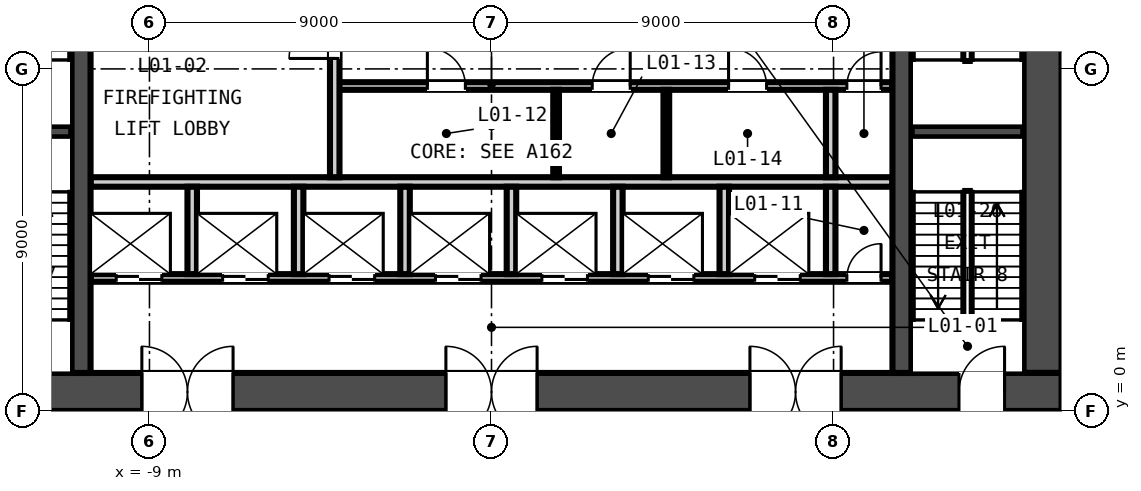
"""IFC4 building model, lengths in metres.
Left out: names, types, materials, properties, quantities, classifications, styles, units other than length and angle.
Written with IfcOpenShell. Run it as: python <this file> out.ifc"""

import sys

from ifc_helpers import new_model, si_unit, direction, frame, frame_2d, origin, place, context, subcontext, project, spatial, rectangle, extrude, element, fill, save


model = new_model("IFC4")
c1 = context("Model", 3, precision=1e-05, world=origin(), true_north=direction((0.0, 1.0)))
c2 = subcontext(c1, "Body", "Model", "MODEL_VIEW")
j1 = project(units=[si_unit("LENGTHUNIT", "METRE"), si_unit("PLANEANGLEUNIT", "RADIAN")], contexts=[c1])
p1 = place(None, origin())
s1 = spatial("IfcSite", under=j1, at=p1, CompositionType="ELEMENT")
p2 = place(p1, origin())
s2 = spatial("IfcBuilding", under=s1, at=p2, CompositionType="ELEMENT")
p3 = place(p2, frame((0.0, 0.0, 9.0)))
s3 = spatial("IfcBuildingStorey", under=s2, at=p3, CompositionType="ELEMENT", Elevation=9.0)
p4 = place(p3, frame((-15.0, 0.5, -0.4), z_axis=(0.0, 0.0, 1.0), x_axis=(1.0, 0.0, 0.0)))
e1 = element("IfcWall", 1, at=p4, inside=s3, PredefinedType="SOLIDWALL", context=c2, shape_type="SweptSolid", body=[
    extrude(rectangle(XDim=30.0, YDim=1.0, at=frame_2d((15.0, 0.0))), origin(), (0.0, 0.0, 1.0), 9.0),
])
p5 = place(p4, frame((5.8, 0.0, 0.4)))
e2 = element("IfcOpeningElement", 2, at=p5, cuts=e1, PredefinedType="OPENING", context=c2, shape_type="SweptSolid", body=[
    extrude(rectangle(XDim=2.4, YDim=2.4, at=frame_2d((1.2, 1.2))), frame((0.0, 0.51, 0.0), z_axis=(0.0, -1.0, 0.0), x_axis=(1.0, 0.0, 0.0)), (0.0, 0.0, 1.0), 1.02),
])
p6 = place(p4, frame((13.8, 0.0, 0.4)))
e3 = element("IfcOpeningElement", 3, at=p6, cuts=e1, PredefinedType="OPENING", context=c2, shape_type="SweptSolid", body=[
    extrude(rectangle(XDim=2.4, YDim=2.4, at=frame_2d((1.2, 1.2))), frame((0.0, 0.51, 0.0), z_axis=(0.0, -1.0, 0.0), x_axis=(1.0, 0.0, 0.0)), (0.0, 0.0, 1.0), 1.02),
])
p7 = place(p4, frame((21.8, 0.0, 0.4)))
e4 = element("IfcOpeningElement", 4, at=p7, cuts=e1, PredefinedType="OPENING", context=c2, shape_type="SweptSolid", body=[
    extrude(rectangle(XDim=2.4, YDim=2.4, at=frame_2d((1.2, 1.2))), frame((0.0, 0.51, 0.0), z_axis=(0.0, -1.0, 0.0), x_axis=(1.0, 0.0, 0.0)), (0.0, 0.0, 1.0), 1.02),
])
p8 = place(p4, frame((1.5, 0.0, 0.4)))
e5 = element("IfcOpeningElement", 5, at=p8, cuts=e1, PredefinedType="OPENING", context=c2, shape_type="SweptSolid", body=[
    extrude(rectangle(XDim=1.2, YDim=2.1, at=frame_2d((0.6, 1.05))), frame((0.0, 0.51, 0.0), z_axis=(0.0, -1.0, 0.0), x_axis=(1.0, 0.0, 0.0)), (0.0, 0.0, 1.0), 1.02),
])
p9 = place(p4, frame((27.3, 0.0, 0.4)))
e6 = element("IfcOpeningElement", 6, at=p9, cuts=e1, PredefinedType="OPENING", context=c2, shape_type="SweptSolid", body=[
    extrude(rectangle(XDim=1.2, YDim=2.1, at=frame_2d((0.6, 1.05))), frame((0.0, 0.51, 0.0), z_axis=(0.0, -1.0, 0.0), x_axis=(1.0, 0.0, 0.0)), (0.0, 0.0, 1.0), 1.02),
])
p10 = place(p3, frame((14.5, 1.0, -0.4), z_axis=(0.0, 0.0, 1.0), x_axis=(0.0, 1.0, 0.0)))
e7 = element("IfcWall", 7, at=p10, inside=s3, PredefinedType="SOLIDWALL", context=c2, shape_type="SweptSolid", body=[
    extrude(rectangle(XDim=13.0, YDim=1.0, at=frame_2d((6.5, 0.0))), origin(), (0.0, 0.0, 1.0), 9.0),
])
for number, where, z_axis, x_axis in (
    (8, (-10.8, 1.0, -0.4), (0.0, 0.0, 1.0), (0.0, 1.0, 0.0)),
    (9, (10.8, 1.0, -0.4), (0.0, 0.0, 1.0), (0.0, 1.0, 0.0)),
):
    element("IfcWall", number, at=place(p3, frame(where, z_axis=z_axis, x_axis=x_axis)), inside=s3, PredefinedType="SOLIDWALL", context=c2, shape_type="SweptSolid", body=[
        extrude(rectangle(XDim=13.0, YDim=0.5, at=frame_2d((6.5, 0.0))), origin(), (0.0, 0.0, 1.0), 9.0),
    ])
p11 = place(p3, frame((-10.55, 3.5, 0.0), z_axis=(0.0, 0.0, 1.0), x_axis=(1.0, 0.0, 0.0)))
e10 = element("IfcWall", 10, at=p11, inside=s3, PredefinedType="PARTITIONING", context=c2, shape_type="SweptSolid", body=[
    extrude(rectangle(XDim=21.1, YDim=0.2, at=frame_2d((10.55, 0.0))), origin(), (0.0, 0.0, 1.0), 8.6),
])
p12 = place(p11, frame((0.675, 0.0, 0.0)))
e11 = element("IfcOpeningElement", 11, at=p12, cuts=e10, PredefinedType="OPENING", context=c2, shape_type="SweptSolid", body=[
    extrude(rectangle(XDim=1.2, YDim=2.1, at=frame_2d((0.6, 1.05))), frame((0.0, 0.11, 0.0), z_axis=(0.0, -1.0, 0.0), x_axis=(1.0, 0.0, 0.0)), (0.0, 0.0, 1.0), 0.22),
])
p13 = place(p11, frame((3.475, 0.0, 0.0)))
e12 = element("IfcOpeningElement", 12, at=p13, cuts=e10, PredefinedType="OPENING", context=c2, shape_type="SweptSolid", body=[
    extrude(rectangle(XDim=1.2, YDim=2.1, at=frame_2d((0.6, 1.05))), frame((0.0, 0.11, 0.0), z_axis=(0.0, -1.0, 0.0), x_axis=(1.0, 0.0, 0.0)), (0.0, 0.0, 1.0), 0.22),
])
p14 = place(p11, frame((6.275, 0.0, 0.0)))
e13 = element("IfcOpeningElement", 13, at=p14, cuts=e10, PredefinedType="OPENING", context=c2, shape_type="SweptSolid", body=[
    extrude(rectangle(XDim=1.2, YDim=2.1, at=frame_2d((0.6, 1.05))), frame((0.0, 0.11, 0.0), z_axis=(0.0, -1.0, 0.0), x_axis=(1.0, 0.0, 0.0)), (0.0, 0.0, 1.0), 0.22),
])
p15 = place(p11, frame((9.075, 0.0, 0.0)))
e14 = element("IfcOpeningElement", 14, at=p15, cuts=e10, PredefinedType="OPENING", context=c2, shape_type="SweptSolid", body=[
    extrude(rectangle(XDim=1.2, YDim=2.1, at=frame_2d((0.6, 1.05))), frame((0.0, 0.11, 0.0), z_axis=(0.0, -1.0, 0.0), x_axis=(1.0, 0.0, 0.0)), (0.0, 0.0, 1.0), 0.22),
])
p16 = place(p11, frame((11.875, 0.0, 0.0)))
e15 = element("IfcOpeningElement", 15, at=p16, cuts=e10, PredefinedType="OPENING", context=c2, shape_type="SweptSolid", body=[
    extrude(rectangle(XDim=1.2, YDim=2.1, at=frame_2d((0.6, 1.05))), frame((0.0, 0.11, 0.0), z_axis=(0.0, -1.0, 0.0), x_axis=(1.0, 0.0, 0.0)), (0.0, 0.0, 1.0), 0.22),
])
p17 = place(p11, frame((14.675, 0.0, 0.0)))
e16 = element("IfcOpeningElement", 16, at=p17, cuts=e10, PredefinedType="OPENING", context=c2, shape_type="SweptSolid", body=[
    extrude(rectangle(XDim=1.2, YDim=2.1, at=frame_2d((0.6, 1.05))), frame((0.0, 0.11, 0.0), z_axis=(0.0, -1.0, 0.0), x_axis=(1.0, 0.0, 0.0)), (0.0, 0.0, 1.0), 0.22),
])
p18 = place(p11, frame((17.475, 0.0, 0.0)))
e17 = element("IfcOpeningElement", 17, at=p18, cuts=e10, PredefinedType="OPENING", context=c2, shape_type="SweptSolid", body=[
    extrude(rectangle(XDim=1.2, YDim=2.1, at=frame_2d((0.6, 1.05))), frame((0.0, 0.11, 0.0), z_axis=(0.0, -1.0, 0.0), x_axis=(1.0, 0.0, 0.0)), (0.0, 0.0, 1.0), 0.22),
])
p19 = place(p11, frame((19.9, 0.0, 0.0)))
e18 = element("IfcOpeningElement", 18, at=p19, cuts=e10, PredefinedType="OPENING", context=c2, shape_type="SweptSolid", body=[
    extrude(rectangle(XDim=0.9, YDim=2.1, at=frame_2d((0.45, 1.05))), frame((0.0, 0.11, 0.0), z_axis=(0.0, -1.0, 0.0), x_axis=(1.0, 0.0, 0.0)), (0.0, 0.0, 1.0), 0.22),
])
p20 = place(p3, frame((-10.55, 6.025, 0.0), z_axis=(0.0, 0.0, 1.0), x_axis=(1.0, 0.0, 0.0)))
e19 = element("IfcWall", 19, at=p20, inside=s3, PredefinedType="PARTITIONING", context=c2, shape_type="SweptSolid", body=[
    extrude(rectangle(XDim=21.1, YDim=0.25, at=frame_2d((10.55, 0.0))), origin(), (0.0, 0.0, 1.0), 8.6),
])
p21 = place(p3, frame((-4.125, 8.55, 0.0), z_axis=(0.0, 0.0, 1.0), x_axis=(1.0, 0.0, 0.0)))
e20 = element("IfcWall", 20, at=p21, inside=s3, PredefinedType="PARTITIONING", context=c2, shape_type="SweptSolid", body=[
    extrude(rectangle(XDim=14.675, YDim=0.2, at=frame_2d((7.337, 0.0))), origin(), (0.0, 0.0, 1.0), 8.6),
])
p22 = place(p21, frame((2.438, 0.0, 0.0)))
e21 = element("IfcOpeningElement", 21, at=p22, cuts=e20, PredefinedType="OPENING", context=c2, shape_type="SweptSolid", body=[
    extrude(rectangle(XDim=1.0, YDim=2.1, at=frame_2d((0.5, 1.05))), frame((0.0, 0.11, 0.0), z_axis=(0.0, -1.0, 0.0), x_axis=(1.0, 0.0, 0.0)), (0.0, 0.0, 1.0), 0.22),
])
p23 = place(p21, frame((6.775, 0.0, 0.0)))
e22 = element("IfcOpeningElement", 22, at=p23, cuts=e20, PredefinedType="OPENING", context=c2, shape_type="SweptSolid", body=[
    extrude(rectangle(XDim=1.0, YDim=2.1, at=frame_2d((0.5, 1.05))), frame((0.0, 0.11, 0.0), z_axis=(0.0, -1.0, 0.0), x_axis=(1.0, 0.0, 0.0)), (0.0, 0.0, 1.0), 0.22),
])
p24 = place(p21, frame((10.363, 0.0, 0.0)))
e23 = element("IfcOpeningElement", 23, at=p24, cuts=e20, PredefinedType="OPENING", context=c2, shape_type="SweptSolid", body=[
    extrude(rectangle(XDim=1.0, YDim=2.1, at=frame_2d((0.5, 1.05))), frame((0.0, 0.11, 0.0), z_axis=(0.0, -1.0, 0.0), x_axis=(1.0, 0.0, 0.0)), (0.0, 0.0, 1.0), 0.22),
])
p25 = place(p21, frame((13.475, 0.0, 0.0)))
e24 = element("IfcOpeningElement", 24, at=p25, cuts=e20, PredefinedType="OPENING", context=c2, shape_type="SweptSolid", body=[
    extrude(rectangle(XDim=0.9, YDim=2.1, at=frame_2d((0.45, 1.05))), frame((0.0, 0.11, 0.0), z_axis=(0.0, -1.0, 0.0), x_axis=(1.0, 0.0, 0.0)), (0.0, 0.0, 1.0), 0.22),
])
p26 = place(p3, frame((-4.125, 6.15, 0.0), z_axis=(0.0, 0.0, 1.0), x_axis=(0.0, 1.0, 0.0)))
e25 = element("IfcWall", 25, at=p26, inside=s3, PredefinedType="PARTITIONING", context=c2, shape_type="SweptSolid", body=[
    extrude(rectangle(XDim=4.95, YDim=0.25, at=frame_2d((2.475, 0.0))), origin(), (0.0, 0.0, 1.0), 8.6),
])
p27 = place(p26, frame((3.125, 0.0, 0.0)))
e26 = element("IfcOpeningElement", 26, at=p27, cuts=e25, PredefinedType="OPENING", context=c2, shape_type="SweptSolid", body=[
    extrude(rectangle(XDim=1.2, YDim=2.1, at=frame_2d((0.6, 1.05))), frame((0.0, 0.135, 0.0), z_axis=(0.0, -1.0, 0.0), x_axis=(1.0, 0.0, 0.0)), (0.0, 0.0, 1.0), 0.27),
])
for number, where, z_axis, x_axis in (
    (27, (-7.875, 3.6, 0.0), (0.0, 0.0, 1.0), (0.0, 1.0, 0.0)),
    (28, (-5.075, 3.6, 0.0), (0.0, 0.0, 1.0), (0.0, 1.0, 0.0)),
    (29, (-2.275, 3.6, 0.0), (0.0, 0.0, 1.0), (0.0, 1.0, 0.0)),
    (30, (0.525, 3.6, 0.0), (0.0, 0.0, 1.0), (0.0, 1.0, 0.0)),
    (31, (3.325, 3.6, 0.0), (0.0, 0.0, 1.0), (0.0, 1.0, 0.0)),
    (32, (6.125, 3.6, 0.0), (0.0, 0.0, 1.0), (0.0, 1.0, 0.0)),
    (33, (8.925, 3.6, 0.0), (0.0, 0.0, 1.0), (0.0, 1.0, 0.0)),
):
    element("IfcWall", number, at=place(p3, frame(where, z_axis=z_axis, x_axis=x_axis)), inside=s3, PredefinedType="PARTITIONING", context=c2, shape_type="SweptSolid", body=[
        extrude(rectangle(XDim=2.3, YDim=0.25, at=frame_2d((1.15, 0.0))), origin(), (0.0, 0.0, 1.0), 8.6),
    ])
for number, where, z_axis, x_axis in (
    (34, (1.7, 6.15, 0.0), (0.0, 0.0, 1.0), (0.0, 1.0, 0.0)),
    (35, (4.6, 6.15, 0.0), (0.0, 0.0, 1.0), (0.0, 1.0, 0.0)),
):
    element("IfcWall", number, at=place(p3, frame(where, z_axis=z_axis, x_axis=x_axis)), inside=s3, PredefinedType="PARTITIONING", context=c2, shape_type="SweptSolid", body=[
        extrude(rectangle(XDim=2.3, YDim=0.15, at=frame_2d((1.15, 0.0))), origin(), (0.0, 0.0, 1.0), 8.6),
    ])
p28 = place(p3, frame((8.925, 6.15, 0.0), z_axis=(0.0, 0.0, 1.0), x_axis=(0.0, 1.0, 0.0)))
e36 = element("IfcWall", 36, at=p28, inside=s3, PredefinedType="PARTITIONING", context=c2, shape_type="SweptSolid", body=[
    extrude(rectangle(XDim=2.3, YDim=0.25, at=frame_2d((1.15, 0.0))), origin(), (0.0, 0.0, 1.0), 8.6),
])
for number, where, z_axis, x_axis in (
    (37, (-14.0, 7.35, -0.4), (0.0, 0.0, 1.0), (1.0, 0.0, 0.0)),
    (38, (11.05, 7.35, -0.4), (0.0, 0.0, 1.0), (1.0, 0.0, 0.0)),
):
    element("IfcWall", number, at=place(p3, frame(where, z_axis=z_axis, x_axis=x_axis)), inside=s3, PredefinedType="SOLIDWALL", context=c2, shape_type="SweptSolid", body=[
        extrude(rectangle(XDim=2.95, YDim=0.3, at=frame_2d((1.475, 0.0))), origin(), (0.0, 0.0, 1.0), 9.0),
    ])
p29 = place(p27, origin())
e39 = element("IfcDoor", 39, at=p29, inside=s3, OperationType="SINGLE_SWING_LEFT", PredefinedType="DOOR", context=c2, shape_type="SweptSolid", body=[
    extrude(rectangle(XDim=1.2, YDim=2.1, at=frame_2d((0.6, 1.05))), frame((0.0, 0.025, 0.0), z_axis=(0.0, -1.0, 0.0), x_axis=(1.0, 0.0, 0.0)), (0.0, 0.0, 1.0), 0.05),
])
fill(e26, e39)
p30 = place(p12, origin())
e40 = element("IfcDoor", 40, at=p30, inside=s3, OperationType="DOUBLE_DOOR_SLIDING", PredefinedType="DOOR", context=c2, shape_type="SweptSolid", body=[
    extrude(rectangle(XDim=1.2, YDim=2.1, at=frame_2d((0.6, 1.05))), frame((0.0, 0.025, 0.0), z_axis=(0.0, -1.0, 0.0), x_axis=(1.0, 0.0, 0.0)), (0.0, 0.0, 1.0), 0.05),
])
fill(e11, e40)
p31 = place(p13, origin())
e41 = element("IfcDoor", 41, at=p31, inside=s3, OperationType="DOUBLE_DOOR_SLIDING", PredefinedType="DOOR", context=c2, shape_type="SweptSolid", body=[
    extrude(rectangle(XDim=1.2, YDim=2.1, at=frame_2d((0.6, 1.05))), frame((0.0, 0.025, 0.0), z_axis=(0.0, -1.0, 0.0), x_axis=(1.0, 0.0, 0.0)), (0.0, 0.0, 1.0), 0.05),
])
fill(e12, e41)
p32 = place(p14, origin())
e42 = element("IfcDoor", 42, at=p32, inside=s3, OperationType="DOUBLE_DOOR_SLIDING", PredefinedType="DOOR", context=c2, shape_type="SweptSolid", body=[
    extrude(rectangle(XDim=1.2, YDim=2.1, at=frame_2d((0.6, 1.05))), frame((0.0, 0.025, 0.0), z_axis=(0.0, -1.0, 0.0), x_axis=(1.0, 0.0, 0.0)), (0.0, 0.0, 1.0), 0.05),
])
fill(e13, e42)
p33 = place(p15, origin())
e43 = element("IfcDoor", 43, at=p33, inside=s3, OperationType="DOUBLE_DOOR_SLIDING", PredefinedType="DOOR", context=c2, shape_type="SweptSolid", body=[
    extrude(rectangle(XDim=1.2, YDim=2.1, at=frame_2d((0.6, 1.05))), frame((0.0, 0.025, 0.0), z_axis=(0.0, -1.0, 0.0), x_axis=(1.0, 0.0, 0.0)), (0.0, 0.0, 1.0), 0.05),
])
fill(e14, e43)
p34 = place(p16, origin())
e44 = element("IfcDoor", 44, at=p34, inside=s3, OperationType="DOUBLE_DOOR_SLIDING", PredefinedType="DOOR", context=c2, shape_type="SweptSolid", body=[
    extrude(rectangle(XDim=1.2, YDim=2.1, at=frame_2d((0.6, 1.05))), frame((0.0, 0.025, 0.0), z_axis=(0.0, -1.0, 0.0), x_axis=(1.0, 0.0, 0.0)), (0.0, 0.0, 1.0), 0.05),
])
fill(e15, e44)
p35 = place(p17, origin())
e45 = element("IfcDoor", 45, at=p35, inside=s3, OperationType="DOUBLE_DOOR_SLIDING", PredefinedType="DOOR", context=c2, shape_type="SweptSolid", body=[
    extrude(rectangle(XDim=1.2, YDim=2.1, at=frame_2d((0.6, 1.05))), frame((0.0, 0.025, 0.0), z_axis=(0.0, -1.0, 0.0), x_axis=(1.0, 0.0, 0.0)), (0.0, 0.0, 1.0), 0.05),
])
fill(e16, e45)
p36 = place(p18, origin())
e46 = element("IfcDoor", 46, at=p36, inside=s3, OperationType="DOUBLE_DOOR_SLIDING", PredefinedType="DOOR", context=c2, shape_type="SweptSolid", body=[
    extrude(rectangle(XDim=1.2, YDim=2.1, at=frame_2d((0.6, 1.05))), frame((0.0, 0.025, 0.0), z_axis=(0.0, -1.0, 0.0), x_axis=(1.0, 0.0, 0.0)), (0.0, 0.0, 1.0), 0.05),
])
fill(e17, e46)
p37 = place(p19, origin())
e47 = element("IfcDoor", 47, at=p37, inside=s3, OperationType="SINGLE_SWING_RIGHT", PredefinedType="DOOR", context=c2, shape_type="SweptSolid", body=[
    extrude(rectangle(XDim=0.9, YDim=2.1, at=frame_2d((0.45, 1.05))), frame((0.0, 0.025, 0.0), z_axis=(0.0, -1.0, 0.0), x_axis=(1.0, 0.0, 0.0)), (0.0, 0.0, 1.0), 0.05),
])
fill(e18, e47)
p38 = place(p22, origin())
e48 = element("IfcDoor", 48, at=p38, inside=s3, OperationType="SINGLE_SWING_LEFT", PredefinedType="DOOR", context=c2, shape_type="SweptSolid", body=[
    extrude(rectangle(XDim=1.0, YDim=2.1, at=frame_2d((0.5, 1.05))), frame((0.0, 0.025, 0.0), z_axis=(0.0, -1.0, 0.0), x_axis=(1.0, 0.0, 0.0)), (0.0, 0.0, 1.0), 0.05),
])
fill(e21, e48)
p39 = place(p23, origin())
e49 = element("IfcDoor", 49, at=p39, inside=s3, OperationType="SINGLE_SWING_RIGHT", PredefinedType="DOOR", context=c2, shape_type="SweptSolid", body=[
    extrude(rectangle(XDim=1.0, YDim=2.1, at=frame_2d((0.5, 1.05))), frame((0.0, 0.025, 0.0), z_axis=(0.0, -1.0, 0.0), x_axis=(1.0, 0.0, 0.0)), (0.0, 0.0, 1.0), 0.05),
])
fill(e22, e49)
p40 = place(p24, origin())
e50 = element("IfcDoor", 50, at=p40, inside=s3, OperationType="SINGLE_SWING_LEFT", PredefinedType="DOOR", context=c2, shape_type="SweptSolid", body=[
    extrude(rectangle(XDim=1.0, YDim=2.1, at=frame_2d((0.5, 1.05))), frame((0.0, 0.025, 0.0), z_axis=(0.0, -1.0, 0.0), x_axis=(1.0, 0.0, 0.0)), (0.0, 0.0, 1.0), 0.05),
])
fill(e23, e50)
p41 = place(p25, origin())
e51 = element("IfcDoor", 51, at=p41, inside=s3, OperationType="SINGLE_SWING_RIGHT", PredefinedType="DOOR", context=c2, shape_type="SweptSolid", body=[
    extrude(rectangle(XDim=0.9, YDim=2.1, at=frame_2d((0.45, 1.05))), frame((0.0, 0.025, 0.0), z_axis=(0.0, -1.0, 0.0), x_axis=(1.0, 0.0, 0.0)), (0.0, 0.0, 1.0), 0.05),
])
fill(e24, e51)
p42 = place(p5, origin())
e52 = element("IfcDoor", 52, at=p42, inside=s3, OperationType="DOUBLE_DOOR_DOUBLE_SWING", PredefinedType="DOOR", context=c2, shape_type="SweptSolid", body=[
    extrude(rectangle(XDim=2.4, YDim=2.4, at=frame_2d((1.2, 1.2))), frame((0.0, 0.025, 0.0), z_axis=(0.0, -1.0, 0.0), x_axis=(1.0, 0.0, 0.0)), (0.0, 0.0, 1.0), 0.05),
])
fill(e2, e52)
p43 = place(p6, origin())
e53 = element("IfcDoor", 53, at=p43, inside=s3, OperationType="DOUBLE_DOOR_DOUBLE_SWING", PredefinedType="DOOR", context=c2, shape_type="SweptSolid", body=[
    extrude(rectangle(XDim=2.4, YDim=2.4, at=frame_2d((1.2, 1.2))), frame((0.0, 0.025, 0.0), z_axis=(0.0, -1.0, 0.0), x_axis=(1.0, 0.0, 0.0)), (0.0, 0.0, 1.0), 0.05),
])
fill(e3, e53)
p44 = place(p7, origin())
e54 = element("IfcDoor", 54, at=p44, inside=s3, OperationType="DOUBLE_DOOR_DOUBLE_SWING", PredefinedType="DOOR", context=c2, shape_type="SweptSolid", body=[
    extrude(rectangle(XDim=2.4, YDim=2.4, at=frame_2d((1.2, 1.2))), frame((0.0, 0.025, 0.0), z_axis=(0.0, -1.0, 0.0), x_axis=(1.0, 0.0, 0.0)), (0.0, 0.0, 1.0), 0.05),
])
fill(e4, e54)
p45 = place(p9, origin())
e55 = element("IfcDoor", 55, at=p45, inside=s3, OperationType="SINGLE_SWING_RIGHT", PredefinedType="DOOR", context=c2, shape_type="SweptSolid", body=[
    extrude(rectangle(XDim=1.2, YDim=2.1, at=frame_2d((0.6, 1.05))), frame((0.0, 0.025, 0.0), z_axis=(0.0, -1.0, 0.0), x_axis=(1.0, 0.0, 0.0)), (0.0, 0.0, 1.0), 0.05),
])
fill(e6, e55)
save(model, sys.argv[1])
